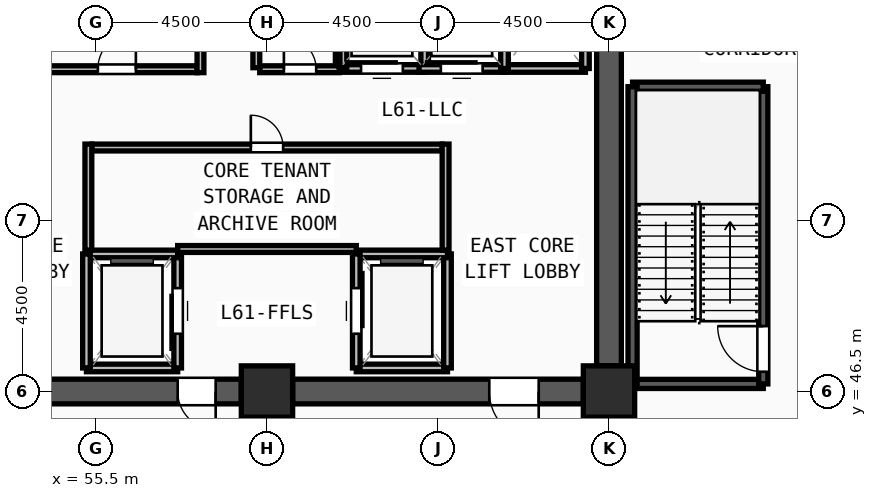
"""IFC4 building model, lengths in metres.
Left out: names, types, materials, properties, quantities, classifications, styles, units other than length and angle.
Written with IfcOpenShell. Run it as: python <this file> out.ifc"""

import sys

from ifc_helpers import new_model, si_unit, direction, frame, frame_2d, origin, origin_2d, place, context, subcontext, project, spatial, rectangle, extrude, source, transform, mapped, element, fill, save


model = new_model("IFC4")
c1 = context("Model", 3, precision=1e-05, world=origin(), true_north=direction((0.0, 1.0)))
c2 = subcontext(c1, "Body", "Model", "MODEL_VIEW")
j1 = project(units=[si_unit("LENGTHUNIT", "METRE"), si_unit("PLANEANGLEUNIT", "RADIAN")], contexts=[c1])
p1 = place(None, origin())
s1 = spatial("IfcSite", under=j1, at=p1, CompositionType="ELEMENT")
p2 = place(p1, origin())
s2 = spatial("IfcBuilding", under=s1, at=p2, CompositionType="ELEMENT")
p3 = place(p2, frame((0.0, 0.0, 236.25)))
s3 = spatial("IfcBuildingStorey", under=s2, at=p3, CompositionType="ELEMENT", Elevation=236.25)
m1 = source(origin(), c2, "Body", "SweptSolid", [
    extrude(rectangle(XDim=1.35, YDim=1.35, at=origin_2d()), origin(), (0.0, 0.0, 1.0), 3.75),
])
for number, where, z_axis, x_axis in (
    (1, (60.0, 46.5, 0.0), (0.0, 0.0, 1.0), (1.0, 0.0, 0.0)),
    (2, (69.0, 46.5, 0.0), (0.0, 0.0, 1.0), (1.0, 0.0, 0.0)),
):
    element("IfcColumn", number, at=place(p3, frame(where, z_axis=z_axis, x_axis=x_axis)), inside=s3, PredefinedType="COLUMN", context=c2, shape_type="MappedRepresentation", body=[
        mapped(m1, transform((0.0, 0.0, 0.0), x_axis=(1.0, 0.0, 0.0), y_axis=(0.0, 1.0, 0.0), z_axis=(0.0, 0.0, 1.0), scale=1.0)),
    ])
p4 = place(p3, frame((69.0, 60.825, 0.0), z_axis=(0.0, 0.0, 1.0), x_axis=(0.0, -1.0, 0.0)))
e3 = element("IfcWall", 3, at=p4, inside=s3, PredefinedType="SHEAR", context=c2, shape_type="SweptSolid", body=[
    extrude(rectangle(XDim=13.65, YDim=0.65, at=frame_2d((6.825, 0.0))), origin(), (0.0, 0.0, 1.0), 3.57),
])
m2 = source(origin(), c2, "Body", "SweptSolid", [
    extrude(rectangle(XDim=1.2, YDim=2.2, at=frame_2d((0.6, 1.1))), frame((0.0, 0.335, 0.0), z_axis=(0.0, -1.0, 0.0), x_axis=(1.0, 0.0, 0.0)), (0.0, 0.0, 1.0), 0.67),
])
p5 = place(p4, frame((1.275, 0.0, 0.0)))
e4 = element("IfcOpeningElement", 4, at=p5, cuts=e3, PredefinedType="OPENING", context=c2, shape_type="MappedRepresentation", body=[
    mapped(m2, transform((0.0, 0.0, 0.0), x_axis=(1.0, 0.0, 0.0), y_axis=(0.0, 1.0, 0.0), z_axis=(0.0, 0.0, 1.0), scale=1.0)),
])
p6 = place(p3, frame((68.325, 46.5, 0.0), z_axis=(0.0, 0.0, 1.0), x_axis=(-1.0, 0.0, 0.0)))
e5 = element("IfcWall", 5, at=p6, inside=s3, PredefinedType="SHEAR", context=c2, shape_type="SweptSolid", body=[
    extrude(rectangle(XDim=7.65, YDim=0.65, at=frame_2d((3.825, 0.0))), origin(), (0.0, 0.0, 1.0), 3.57),
])
m3 = source(origin(), c2, "Body", "SweptSolid", [
    extrude(rectangle(XDim=1.3, YDim=2.2, at=frame_2d((0.65, 1.1))), frame((0.0, 0.335, 0.0), z_axis=(0.0, -1.0, 0.0), x_axis=(1.0, 0.0, 0.0)), (0.0, 0.0, 1.0), 0.67),
])
p7 = place(p6, frame((1.175, 0.0, 0.0)))
e6 = element("IfcOpeningElement", 6, at=p7, cuts=e5, PredefinedType="OPENING", context=c2, shape_type="MappedRepresentation", body=[
    mapped(m3, transform((0.0, 0.0, 0.0), x_axis=(1.0, 0.0, 0.0), y_axis=(0.0, 1.0, 0.0), z_axis=(0.0, 0.0, 1.0), scale=1.0)),
])
p8 = place(p3, frame((59.325, 46.5, 0.0), z_axis=(0.0, 0.0, 1.0), x_axis=(-1.0, 0.0, 0.0)))
e7 = element("IfcWall", 7, at=p8, inside=s3, PredefinedType="SHEAR", context=c2, shape_type="SweptSolid", body=[
    extrude(rectangle(XDim=7.65, YDim=0.65, at=frame_2d((3.825, 0.0))), origin(), (0.0, 0.0, 1.0), 3.57),
])
p9 = place(p8, frame((5.175, 0.0, 0.0)))
e8 = element("IfcOpeningElement", 8, at=p9, cuts=e7, PredefinedType="OPENING", context=c2, shape_type="MappedRepresentation", body=[
    mapped(m3, transform((0.0, 0.0, 0.0), x_axis=(1.0, 0.0, 0.0), y_axis=(0.0, 1.0, 0.0), z_axis=(0.0, 0.0, 1.0), scale=1.0)),
])
m4 = source(origin(), c2, "Body", "SweptSolid", [
    extrude(rectangle(XDim=1.0, YDim=2.2, at=frame_2d((0.5, 1.1))), frame((0.0, 0.335, 0.0), z_axis=(0.0, -1.0, 0.0), x_axis=(1.0, 0.0, 0.0)), (0.0, 0.0, 1.0), 0.67),
])
p10 = place(p8, frame((0.675, 0.0, 0.0)))
e9 = element("IfcOpeningElement", 9, at=p10, cuts=e7, PredefinedType="OPENING", context=c2, shape_type="MappedRepresentation", body=[
    mapped(m4, transform((0.0, 0.0, 0.0), x_axis=(1.0, 0.0, 0.0), y_axis=(0.0, 1.0, 0.0), z_axis=(0.0, 0.0, 1.0), scale=1.0)),
])
p11 = place(p3, frame((69.62, 46.7, 0.0), z_axis=(0.0, 0.0, 1.0), x_axis=(1.0, 0.0, 0.0)))
e10 = element("IfcWall", 10, at=p11, inside=s3, PredefinedType="SOLIDWALL", context=c2, shape_type="SweptSolid", body=[
    extrude(rectangle(XDim=3.44, YDim=0.24, at=frame_2d((1.72, 0.0))), origin(), (0.0, 0.0, 1.0), 3.57),
])
p12 = place(p3, frame((73.06, 46.7, 0.0), z_axis=(0.0, 0.0, 1.0), x_axis=(0.0, 1.0, 0.0)))
e11 = element("IfcWall", 11, at=p12, inside=s3, PredefinedType="SOLIDWALL", context=c2, shape_type="SweptSolid", body=[
    extrude(rectangle(XDim=7.82, YDim=0.24, at=frame_2d((3.91, 0.0))), origin(), (0.0, 0.0, 1.0), 3.57),
])
m5 = source(origin(), c2, "Body", "SweptSolid", [
    extrude(rectangle(XDim=1.2, YDim=2.2, at=frame_2d((0.6, 1.1))), frame((0.0, 0.13, 0.0), z_axis=(0.0, -1.0, 0.0), x_axis=(1.0, 0.0, 0.0)), (0.0, 0.0, 1.0), 0.26),
])
p13 = place(p12, frame((0.32, 0.0, 0.0)))
e12 = element("IfcOpeningElement", 12, at=p13, cuts=e11, PredefinedType="OPENING", context=c2, shape_type="MappedRepresentation", body=[
    mapped(m5, transform((0.0, 0.0, 0.0), x_axis=(1.0, 0.0, 0.0), y_axis=(0.0, 1.0, 0.0), z_axis=(0.0, 0.0, 1.0), scale=1.0)),
])
p14 = place(p3, frame((73.06, 54.52, 0.0), z_axis=(0.0, 0.0, 1.0), x_axis=(-1.0, 0.0, 0.0)))
e13 = element("IfcWall", 13, at=p14, inside=s3, PredefinedType="SOLIDWALL", context=c2, shape_type="SweptSolid", body=[
    extrude(rectangle(XDim=3.44, YDim=0.24, at=frame_2d((1.72, 0.0))), origin(), (0.0, 0.0, 1.0), 3.57),
])
p15 = place(p3, frame((69.62, 54.52, 0.0), z_axis=(0.0, 0.0, 1.0), x_axis=(0.0, -1.0, 0.0)))
e14 = element("IfcWall", 14, at=p15, inside=s3, PredefinedType="SOLIDWALL", context=c2, shape_type="SweptSolid", body=[
    extrude(rectangle(XDim=7.82, YDim=0.24, at=frame_2d((3.91, 0.0))), origin(), (0.0, 0.0, 1.0), 3.57),
])
p16 = place(p3, frame((55.25, 47.12, 0.0), z_axis=(0.0, 0.0, 1.0), x_axis=(1.0, 0.0, 0.0)))
e15 = element("IfcWall", 15, at=p16, inside=s3, PredefinedType="SOLIDWALL", context=c2, shape_type="SweptSolid", body=[
    extrude(rectangle(XDim=2.4, YDim=0.2, at=frame_2d((1.2, 0.0))), origin(), (0.0, 0.0, 1.0), 3.57),
])
p17 = place(p3, frame((57.65, 47.12, 0.0), z_axis=(0.0, 0.0, 1.0), x_axis=(0.0, 1.0, 0.0)))
e16 = element("IfcWall", 16, at=p17, inside=s3, PredefinedType="SOLIDWALL", context=c2, shape_type="SweptSolid", body=[
    extrude(rectangle(XDim=3.0, YDim=0.2, at=frame_2d((1.5, 0.0))), origin(), (0.0, 0.0, 1.0), 3.57),
])
m6 = source(origin(), c2, "Body", "SweptSolid", [
    extrude(rectangle(XDim=1.2, YDim=2.3, at=frame_2d((0.6, 1.15))), frame((0.0, 0.11, 0.0), z_axis=(0.0, -1.0, 0.0), x_axis=(1.0, 0.0, 0.0)), (0.0, 0.0, 1.0), 0.22),
])
p18 = place(p17, frame((0.9, 0.0, 0.0)))
e17 = element("IfcOpeningElement", 17, at=p18, cuts=e16, PredefinedType="OPENING", context=c2, shape_type="MappedRepresentation", body=[
    mapped(m6, transform((0.0, 0.0, 0.0), x_axis=(1.0, 0.0, 0.0), y_axis=(0.0, 1.0, 0.0), z_axis=(0.0, 0.0, 1.0), scale=1.0)),
])
p19 = place(p3, frame((57.65, 50.12, 0.0), z_axis=(0.0, 0.0, 1.0), x_axis=(-1.0, 0.0, 0.0)))
e18 = element("IfcWall", 18, at=p19, inside=s3, PredefinedType="SOLIDWALL", context=c2, shape_type="SweptSolid", body=[
    extrude(rectangle(XDim=2.4, YDim=0.2, at=frame_2d((1.2, 0.0))), origin(), (0.0, 0.0, 1.0), 3.57),
])
p20 = place(p3, frame((55.25, 50.12, 0.0), z_axis=(0.0, 0.0, 1.0), x_axis=(0.0, -1.0, 0.0)))
e19 = element("IfcWall", 19, at=p20, inside=s3, PredefinedType="SOLIDWALL", context=c2, shape_type="SweptSolid", body=[
    extrude(rectangle(XDim=3.0, YDim=0.2, at=frame_2d((1.5, 0.0))), origin(), (0.0, 0.0, 1.0), 3.57),
])
p21 = place(p3, frame((62.35, 47.12, 0.0), z_axis=(0.0, 0.0, 1.0), x_axis=(1.0, 0.0, 0.0)))
e20 = element("IfcWall", 20, at=p21, inside=s3, PredefinedType="SOLIDWALL", context=c2, shape_type="SweptSolid", body=[
    extrude(rectangle(XDim=2.4, YDim=0.2, at=frame_2d((1.2, 0.0))), origin(), (0.0, 0.0, 1.0), 3.57),
])
p22 = place(p3, frame((64.75, 47.12, 0.0), z_axis=(0.0, 0.0, 1.0), x_axis=(0.0, 1.0, 0.0)))
e21 = element("IfcWall", 21, at=p22, inside=s3, PredefinedType="SOLIDWALL", context=c2, shape_type="SweptSolid", body=[
    extrude(rectangle(XDim=3.0, YDim=0.2, at=frame_2d((1.5, 0.0))), origin(), (0.0, 0.0, 1.0), 3.57),
])
p23 = place(p3, frame((64.75, 50.12, 0.0), z_axis=(0.0, 0.0, 1.0), x_axis=(-1.0, 0.0, 0.0)))
e22 = element("IfcWall", 22, at=p23, inside=s3, PredefinedType="SOLIDWALL", context=c2, shape_type="SweptSolid", body=[
    extrude(rectangle(XDim=2.4, YDim=0.2, at=frame_2d((1.2, 0.0))), origin(), (0.0, 0.0, 1.0), 3.57),
])
p24 = place(p3, frame((62.35, 50.12, 0.0), z_axis=(0.0, 0.0, 1.0), x_axis=(0.0, -1.0, 0.0)))
e23 = element("IfcWall", 23, at=p24, inside=s3, PredefinedType="SOLIDWALL", context=c2, shape_type="SweptSolid", body=[
    extrude(rectangle(XDim=3.0, YDim=0.2, at=frame_2d((1.5, 0.0))), origin(), (0.0, 0.0, 1.0), 3.57),
])
p25 = place(p24, frame((0.9, 0.0, 0.0)))
e24 = element("IfcOpeningElement", 24, at=p25, cuts=e23, PredefinedType="OPENING", context=c2, shape_type="MappedRepresentation", body=[
    mapped(m6, transform((0.0, 0.0, 0.0), x_axis=(1.0, 0.0, 0.0), y_axis=(0.0, 1.0, 0.0), z_axis=(0.0, 0.0, 1.0), scale=1.0)),
])
p26 = place(p3, frame((66.2, 55.0, 0.0), z_axis=(0.0, 0.0, 1.0), x_axis=(1.0, 0.0, 0.0)))
e25 = element("IfcWall", 25, at=p26, inside=s3, PredefinedType="SOLIDWALL", context=c2, shape_type="SweptSolid", body=[
    extrude(rectangle(XDim=2.18, YDim=0.2, at=frame_2d((1.09, 0.0))), origin(), (0.0, 0.0, 1.0), 3.57),
])
p27 = place(p3, frame((68.38, 55.0, 0.0), z_axis=(0.0, 0.0, 1.0), x_axis=(0.0, 1.0, 0.0)))
e26 = element("IfcWall", 26, at=p27, inside=s3, PredefinedType="SOLIDWALL", context=c2, shape_type="SweptSolid", body=[
    extrude(rectangle(XDim=2.75, YDim=0.2, at=frame_2d((1.375, 0.0))), origin(), (0.0, 0.0, 1.0), 3.57),
])
p28 = place(p3, frame((61.9, 55.0, 0.0), z_axis=(0.0, 0.0, 1.0), x_axis=(1.0, 0.0, 0.0)))
e27 = element("IfcWall", 27, at=p28, inside=s3, PredefinedType="SOLIDWALL", context=c2, shape_type="SweptSolid", body=[
    extrude(rectangle(XDim=2.25, YDim=0.2, at=frame_2d((1.125, 0.0))), origin(), (0.0, 0.0, 1.0), 3.57),
])
m7 = source(origin(), c2, "Body", "SweptSolid", [
    extrude(rectangle(XDim=1.1, YDim=2.2, at=frame_2d((0.55, 1.1))), frame((0.0, 0.11, 0.0), z_axis=(0.0, -1.0, 0.0), x_axis=(1.0, 0.0, 0.0)), (0.0, 0.0, 1.0), 0.22),
])
p29 = place(p28, frame((0.575, 0.0, 0.0)))
e28 = element("IfcOpeningElement", 28, at=p29, cuts=e27, PredefinedType="OPENING", context=c2, shape_type="MappedRepresentation", body=[
    mapped(m7, transform((0.0, 0.0, 0.0), x_axis=(1.0, 0.0, 0.0), y_axis=(0.0, 1.0, 0.0), z_axis=(0.0, 0.0, 1.0), scale=1.0)),
])
for number, where, z_axis, x_axis in (
    (29, (64.15, 55.0, 0.0), (0.0, 0.0, 1.0), (0.0, 1.0, 0.0)),
    (30, (61.9, 57.6, 0.0), (0.0, 0.0, 1.0), (0.0, -1.0, 0.0)),
):
    element("IfcWall", number, at=place(p3, frame(where, z_axis=z_axis, x_axis=x_axis)), inside=s3, PredefinedType="SOLIDWALL", context=c2, shape_type="SweptSolid", body=[
        extrude(rectangle(XDim=2.6, YDim=0.2, at=frame_2d((1.3, 0.0))), origin(), (0.0, 0.0, 1.0), 3.57),
    ])
p30 = place(p3, frame((64.0, 55.0, 0.0), z_axis=(0.0, 0.0, 1.0), x_axis=(1.0, 0.0, 0.0)))
e31 = element("IfcWall", 31, at=p30, inside=s3, PredefinedType="SOLIDWALL", context=c2, shape_type="SweptSolid", body=[
    extrude(rectangle(XDim=2.25, YDim=0.2, at=frame_2d((1.125, 0.0))), origin(), (0.0, 0.0, 1.0), 3.57),
])
p31 = place(p30, frame((0.575, 0.0, 0.0)))
e32 = element("IfcOpeningElement", 32, at=p31, cuts=e31, PredefinedType="OPENING", context=c2, shape_type="MappedRepresentation", body=[
    mapped(m7, transform((0.0, 0.0, 0.0), x_axis=(1.0, 0.0, 0.0), y_axis=(0.0, 1.0, 0.0), z_axis=(0.0, 0.0, 1.0), scale=1.0)),
])
p32 = place(p3, frame((66.25, 55.0, 0.0), z_axis=(0.0, 0.0, 1.0), x_axis=(0.0, 1.0, 0.0)))
e33 = element("IfcWall", 33, at=p32, inside=s3, PredefinedType="SOLIDWALL", context=c2, shape_type="SweptSolid", body=[
    extrude(rectangle(XDim=2.6, YDim=0.2, at=frame_2d((1.3, 0.0))), origin(), (0.0, 0.0, 1.0), 3.57),
])
p33 = place(p3, frame((55.39, 52.92, 0.0), z_axis=(0.0, 0.0, 1.0), x_axis=(1.0, 0.0, 0.0)))
e34 = element("IfcWall", 34, at=p33, inside=s3, PredefinedType="PARTITIONING", context=c2, shape_type="SweptSolid", body=[
    extrude(rectangle(XDim=9.22, YDim=0.18, at=frame_2d((4.61, 0.0))), origin(), (0.0, 0.0, 1.0), 3.57),
])
m8 = source(origin(), c2, "Body", "SweptSolid", [
    extrude(rectangle(XDim=0.85, YDim=2.1, at=frame_2d((0.425, 1.05))), frame((0.0, 0.1, 0.0), z_axis=(0.0, -1.0, 0.0), x_axis=(1.0, 0.0, 0.0)), (0.0, 0.0, 1.0), 0.2),
])
p34 = place(p33, frame((4.185, 0.0, 0.0)))
e35 = element("IfcOpeningElement", 35, at=p34, cuts=e34, PredefinedType="OPENING", context=c2, shape_type="MappedRepresentation", body=[
    mapped(m8, transform((0.0, 0.0, 0.0), x_axis=(1.0, 0.0, 0.0), y_axis=(0.0, 1.0, 0.0), z_axis=(0.0, 0.0, 1.0), scale=1.0)),
])
p35 = place(p3, frame((53.95, 54.98, 0.0), z_axis=(0.0, 0.0, 1.0), x_axis=(1.0, 0.0, 0.0)))
e36 = element("IfcWall", 36, at=p35, inside=s3, PredefinedType="PARTITIONING", context=c2, shape_type="SweptSolid", body=[
    extrude(rectangle(XDim=4.21, YDim=0.18, at=frame_2d((2.105, 0.0))), origin(), (0.0, 0.0, 1.0), 3.57),
])
m9 = source(origin(), c2, "Body", "SweptSolid", [
    extrude(rectangle(XDim=1.0, YDim=2.2, at=frame_2d((0.5, 1.1))), frame((0.0, 0.1, 0.0), z_axis=(0.0, -1.0, 0.0), x_axis=(1.0, 0.0, 0.0)), (0.0, 0.0, 1.0), 0.2),
])
p36 = place(p35, frame((1.6, 0.0, 0.0)))
e37 = element("IfcOpeningElement", 37, at=p36, cuts=e36, PredefinedType="OPENING", context=c2, shape_type="MappedRepresentation", body=[
    mapped(m9, transform((0.0, 0.0, 0.0), x_axis=(1.0, 0.0, 0.0), y_axis=(0.0, 1.0, 0.0), z_axis=(0.0, 0.0, 1.0), scale=1.0)),
])
p37 = place(p3, frame((59.81, 54.98, 0.0), z_axis=(0.0, 0.0, 1.0), x_axis=(1.0, 0.0, 0.0)))
e38 = element("IfcWall", 38, at=p37, inside=s3, PredefinedType="PARTITIONING", context=c2, shape_type="SweptSolid", body=[
    extrude(rectangle(XDim=2.09, YDim=0.18, at=frame_2d((1.045, 0.0))), origin(), (0.0, 0.0, 1.0), 3.57),
])
p38 = place(p37, frame((0.635, 0.0, 0.0)))
e39 = element("IfcOpeningElement", 39, at=p38, cuts=e38, PredefinedType="OPENING", context=c2, shape_type="MappedRepresentation", body=[
    mapped(m8, transform((0.0, 0.0, 0.0), x_axis=(1.0, 0.0, 0.0), y_axis=(0.0, 1.0, 0.0), z_axis=(0.0, 0.0, 1.0), scale=1.0)),
])
for number, where, z_axis, x_axis in (
    (40, (59.72, 55.02, 0.0), (0.0, 0.0, 1.0), (0.0, 1.0, 0.0)),
    (41, (62.01, 55.02, 0.0), (0.0, 0.0, 1.0), (0.0, 1.0, 0.0)),
):
    element("IfcWall", number, at=place(p3, frame(where, z_axis=z_axis, x_axis=x_axis)), inside=s3, PredefinedType="PARTITIONING", context=c2, shape_type="SweptSolid", body=[
        extrude(rectangle(XDim=2.88, YDim=0.18, at=frame_2d((1.44, 0.0))), origin(), (0.0, 0.0, 1.0), 3.57),
    ])
for number, where, z_axis, x_axis in (
    (42, (55.3, 50.22, 0.0), (0.0, 0.0, 1.0), (0.0, 1.0, 0.0)),
    (43, (64.7, 50.22, 0.0), (0.0, 0.0, 1.0), (0.0, 1.0, 0.0)),
):
    element("IfcWall", number, at=place(p3, frame(where, z_axis=z_axis, x_axis=x_axis)), inside=s3, PredefinedType="PARTITIONING", context=c2, shape_type="SweptSolid", body=[
        extrude(rectangle(XDim=2.79, YDim=0.18, at=frame_2d((1.395, 0.0))), origin(), (0.0, 0.0, 1.0), 3.57),
    ])
p39 = place(p3, frame((57.65, 50.25, 0.0), z_axis=(0.0, 0.0, 1.0), x_axis=(1.0, 0.0, 0.0)))
e44 = element("IfcWall", 44, at=p39, inside=s3, PredefinedType="PARTITIONING", context=c2, shape_type="SweptSolid", body=[
    extrude(rectangle(XDim=4.7, YDim=0.18, at=frame_2d((2.35, 0.0))), origin(), (0.0, 0.0, 1.0), 3.57),
])
p40 = place(p3, frame((58.25, 54.89, 0.0), z_axis=(0.0, 0.0, 1.0), x_axis=(0.0, 1.0, 0.0)))
e45 = element("IfcWall", 45, at=p40, inside=s3, PredefinedType="PARTITIONING", context=c2, shape_type="SweptSolid", body=[
    extrude(rectangle(XDim=3.02, YDim=0.18, at=frame_2d((1.51, 0.0))), origin(), (0.0, 0.0, 1.0), 3.57),
])
m10 = source(origin(), c2, "Body", "SweptSolid", [
    extrude(rectangle(XDim=1.0, YDim=2.2, at=frame_2d((0.5, 1.1))), frame((0.0, 0.025, 0.0), z_axis=(0.0, -1.0, 0.0), x_axis=(1.0, 0.0, 0.0)), (0.0, 0.0, 1.0), 0.05),
])
p41 = place(p10, origin())
e46 = element("IfcDoor", 46, at=p41, inside=s3, OperationType="SINGLE_SWING_LEFT", PredefinedType="DOOR", context=c2, shape_type="MappedRepresentation", body=[
    mapped(m10, transform((0.0, 0.0, 0.0), x_axis=(1.0, 0.0, 0.0), y_axis=(0.0, 1.0, 0.0), z_axis=(0.0, 0.0, 1.0), scale=1.0)),
])
fill(e9, e46)
m11 = source(origin(), c2, "Body", "SweptSolid", [
    extrude(rectangle(XDim=1.3, YDim=2.2, at=frame_2d((0.65, 1.1))), frame((0.0, 0.025, 0.0), z_axis=(0.0, -1.0, 0.0), x_axis=(1.0, 0.0, 0.0)), (0.0, 0.0, 1.0), 0.05),
])
p42 = place(p7, origin())
e47 = element("IfcDoor", 47, at=p42, inside=s3, OperationType="SINGLE_SWING_LEFT", PredefinedType="DOOR", context=c2, shape_type="MappedRepresentation", body=[
    mapped(m11, transform((0.0, 0.0, 0.0), x_axis=(1.0, 0.0, 0.0), y_axis=(0.0, 1.0, 0.0), z_axis=(0.0, 0.0, 1.0), scale=1.0)),
])
fill(e6, e47)
m12 = source(origin(), c2, "Body", "SweptSolid", [
    extrude(rectangle(XDim=1.2, YDim=2.2, at=frame_2d((0.6, 1.1))), frame((0.0, 0.025, 0.0), z_axis=(0.0, -1.0, 0.0), x_axis=(1.0, 0.0, 0.0)), (0.0, 0.0, 1.0), 0.05),
])
p43 = place(p13, origin())
e48 = element("IfcDoor", 48, at=p43, inside=s3, OperationType="SINGLE_SWING_RIGHT", PredefinedType="DOOR", context=c2, shape_type="MappedRepresentation", body=[
    mapped(m12, transform((0.0, 0.0, 0.0), x_axis=(1.0, 0.0, 0.0), y_axis=(0.0, 1.0, 0.0), z_axis=(0.0, 0.0, 1.0), scale=1.0)),
])
fill(e12, e48)
m13 = source(origin(), c2, "Body", "SweptSolid", [
    extrude(rectangle(XDim=1.2, YDim=2.3, at=frame_2d((0.6, 1.15))), frame((0.0, 0.025, 0.0), z_axis=(0.0, -1.0, 0.0), x_axis=(1.0, 0.0, 0.0)), (0.0, 0.0, 1.0), 0.05),
])
p44 = place(p18, origin())
e49 = element("IfcDoor", 49, at=p44, inside=s3, OperationType="SLIDING_TO_LEFT", PredefinedType="DOOR", context=c2, shape_type="MappedRepresentation", body=[
    mapped(m13, transform((0.0, 0.0, 0.0), x_axis=(1.0, 0.0, 0.0), y_axis=(0.0, 1.0, 0.0), z_axis=(0.0, 0.0, 1.0), scale=1.0)),
])
fill(e17, e49)
p45 = place(p25, origin())
e50 = element("IfcDoor", 50, at=p45, inside=s3, OperationType="SLIDING_TO_LEFT", PredefinedType="DOOR", context=c2, shape_type="MappedRepresentation", body=[
    mapped(m13, transform((0.0, 0.0, 0.0), x_axis=(1.0, 0.0, 0.0), y_axis=(0.0, 1.0, 0.0), z_axis=(0.0, 0.0, 1.0), scale=1.0)),
])
fill(e24, e50)
m14 = source(origin(), c2, "Body", "SweptSolid", [
    extrude(rectangle(XDim=1.1, YDim=2.2, at=frame_2d((0.55, 1.1))), frame((0.0, 0.025, 0.0), z_axis=(0.0, -1.0, 0.0), x_axis=(1.0, 0.0, 0.0)), (0.0, 0.0, 1.0), 0.05),
])
p46 = place(p29, origin())
e51 = element("IfcDoor", 51, at=p46, inside=s3, OperationType="SLIDING_TO_LEFT", PredefinedType="DOOR", context=c2, shape_type="MappedRepresentation", body=[
    mapped(m14, transform((0.0, 0.0, 0.0), x_axis=(1.0, 0.0, 0.0), y_axis=(0.0, 1.0, 0.0), z_axis=(0.0, 0.0, 1.0), scale=1.0)),
])
fill(e28, e51)
p47 = place(p31, origin())
e52 = element("IfcDoor", 52, at=p47, inside=s3, OperationType="SLIDING_TO_LEFT", PredefinedType="DOOR", context=c2, shape_type="MappedRepresentation", body=[
    mapped(m14, transform((0.0, 0.0, 0.0), x_axis=(1.0, 0.0, 0.0), y_axis=(0.0, 1.0, 0.0), z_axis=(0.0, 0.0, 1.0), scale=1.0)),
])
fill(e32, e52)
m15 = source(origin(), c2, "Body", "SweptSolid", [
    extrude(rectangle(XDim=0.85, YDim=2.1, at=frame_2d((0.425, 1.05))), frame((0.0, 0.025, 0.0), z_axis=(0.0, -1.0, 0.0), x_axis=(1.0, 0.0, 0.0)), (0.0, 0.0, 1.0), 0.05),
])
p48 = place(p34, origin())
e53 = element("IfcDoor", 53, at=p48, inside=s3, OperationType="SINGLE_SWING_LEFT", PredefinedType="DOOR", context=c2, shape_type="MappedRepresentation", body=[
    mapped(m15, transform((0.0, 0.0, 0.0), x_axis=(1.0, 0.0, 0.0), y_axis=(0.0, 1.0, 0.0), z_axis=(0.0, 0.0, 1.0), scale=1.0)),
])
fill(e35, e53)
p49 = place(p36, origin())
e54 = element("IfcDoor", 54, at=p49, inside=s3, OperationType="SINGLE_SWING_RIGHT", PredefinedType="DOOR", context=c2, shape_type="MappedRepresentation", body=[
    mapped(m10, transform((0.0, 0.0, 0.0), x_axis=(1.0, 0.0, 0.0), y_axis=(0.0, 1.0, 0.0), z_axis=(0.0, 0.0, 1.0), scale=1.0)),
])
fill(e37, e54)
p50 = place(p38, origin())
e55 = element("IfcDoor", 55, at=p50, inside=s3, OperationType="SINGLE_SWING_LEFT", PredefinedType="DOOR", context=c2, shape_type="MappedRepresentation", body=[
    mapped(m15, transform((0.0, 0.0, 0.0), x_axis=(1.0, 0.0, 0.0), y_axis=(0.0, 1.0, 0.0), z_axis=(0.0, 0.0, 1.0), scale=1.0)),
])
fill(e39, e55)
save(model, sys.argv[1])
